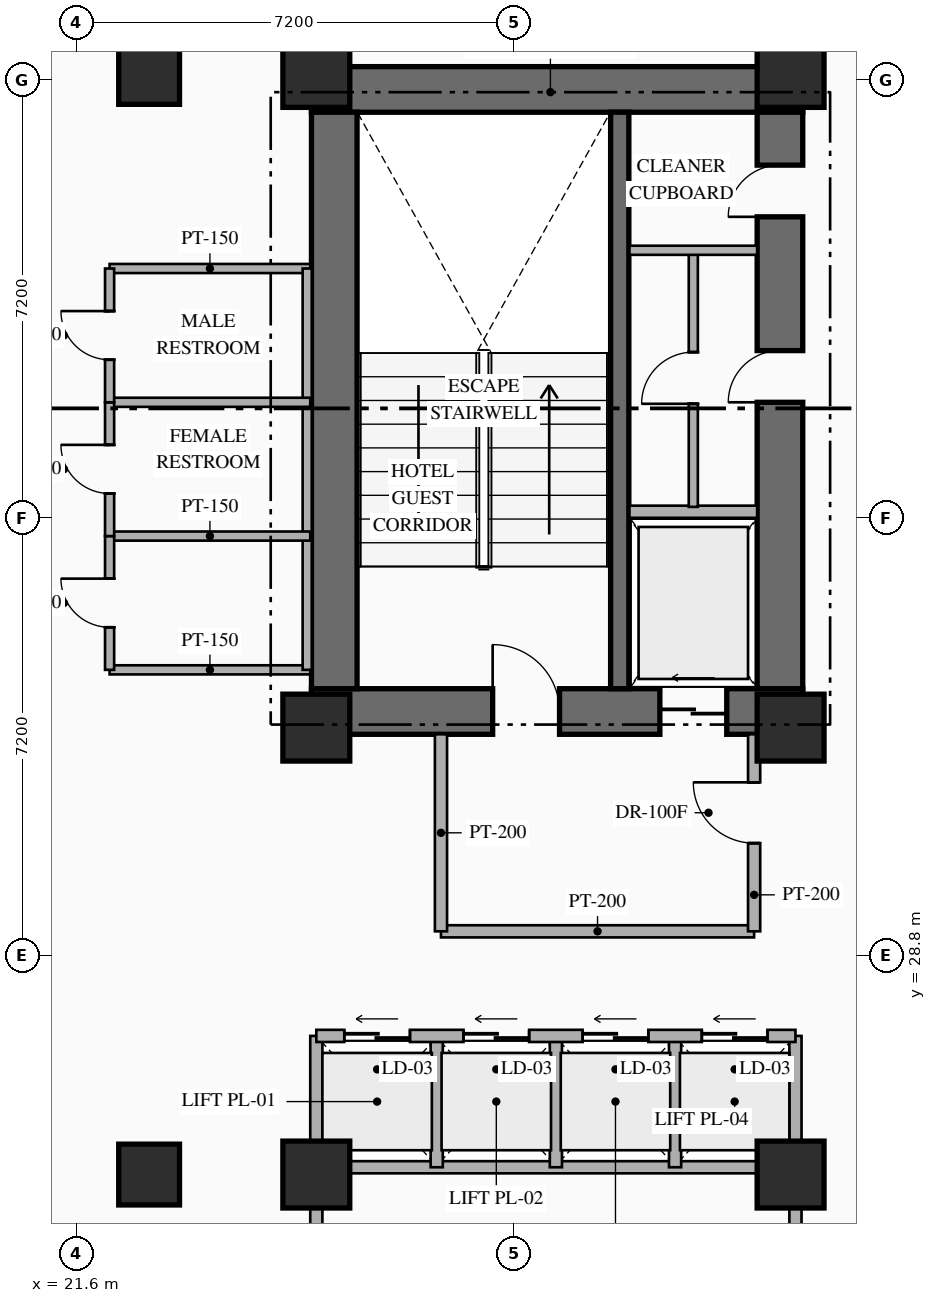
"""IFC4 building model, lengths in metres.
Left out: names, types, materials, properties, quantities, classifications, styles, units other than length and angle.
Written with IfcOpenShell. Run it as: python <this file> out.ifc"""

import sys

from ifc_helpers import new_model, si_unit, direction, frame, frame_2d, origin, origin_2d, place, context, subcontext, project, spatial, rectangle, hollow_rectangle, extrude, element, fill, save


model = new_model("IFC4")
c1 = context("Model", 3, precision=1e-05, world=origin(), true_north=direction((0.0, 1.0)))
c2 = subcontext(c1, "Body", "Model", "MODEL_VIEW")
j1 = project(units=[si_unit("LENGTHUNIT", "METRE"), si_unit("PLANEANGLEUNIT", "RADIAN")], contexts=[c1])
p1 = place(None, origin())
s1 = spatial("IfcSite", under=j1, at=p1, CompositionType="ELEMENT")
p2 = place(p1, origin())
s2 = spatial("IfcBuilding", under=s1, at=p2, CompositionType="ELEMENT")
p3 = place(p2, frame((0.0, 0.0, 43.3)))
s3 = spatial("IfcBuildingStorey", under=s2, at=p3, CompositionType="ELEMENT", Elevation=43.3)
p4 = place(p3, frame((25.47, 32.815, 0.0), z_axis=(0.0, 0.0, 1.0), x_axis=(1.0, 0.0, 0.0)))
e1 = element("IfcWall", 1, at=p4, inside=s3, PredefinedType="SHEAR", context=c2, shape_type="SweptSolid", body=[
    extrude(rectangle(XDim=8.08, YDim=0.75, at=frame_2d((4.04, 0.0))), origin(), (0.0, 0.0, 1.0), 3.35),
])
p5 = place(p4, frame((2.98, 0.0, 0.0)))
e2 = element("IfcOpeningElement", 2, at=p5, cuts=e1, PredefinedType="OPENING", context=c2, shape_type="SweptSolid", body=[
    extrude(rectangle(XDim=1.1, YDim=2.2, at=frame_2d((0.55, 1.1))), frame((0.0, 0.385, 0.0), z_axis=(0.0, -1.0, 0.0), x_axis=(1.0, 0.0, 0.0)), (0.0, 0.0, 1.0), 0.77),
])
p6 = place(p4, frame((5.73, 0.0, 0.0)))
e3 = element("IfcOpeningElement", 3, at=p6, cuts=e1, PredefinedType="OPENING", context=c2, shape_type="SweptSolid", body=[
    extrude(rectangle(XDim=1.1, YDim=2.15, at=frame_2d((0.55, 1.075))), frame((0.0, 0.385, 0.0), z_axis=(0.0, -1.0, 0.0), x_axis=(1.0, 0.0, 0.0)), (0.0, 0.0, 1.0), 0.77),
])
p7 = place(p3, frame((25.47, 43.045, 0.0), z_axis=(0.0, 0.0, 1.0), x_axis=(1.0, 0.0, 0.0)))
e4 = element("IfcWall", 4, at=p7, inside=s3, PredefinedType="SHEAR", context=c2, shape_type="SweptSolid", body=[
    extrude(rectangle(XDim=8.08, YDim=0.75, at=frame_2d((4.04, 0.0))), origin(), (0.0, 0.0, 1.0), 3.35),
])
p8 = place(p3, frame((25.845, 33.19, 0.0), z_axis=(0.0, 0.0, 1.0), x_axis=(0.0, 1.0, 0.0)))
e5 = element("IfcWall", 5, at=p8, inside=s3, PredefinedType="SHEAR", context=c2, shape_type="SweptSolid", body=[
    extrude(rectangle(XDim=9.48, YDim=0.75, at=frame_2d((4.74, 0.0))), origin(), (0.0, 0.0, 1.0), 3.35),
])
p9 = place(p3, frame((33.175, 33.19, 0.0), z_axis=(0.0, 0.0, 1.0), x_axis=(0.0, 1.0, 0.0)))
e6 = element("IfcWall", 6, at=p9, inside=s3, PredefinedType="SHEAR", context=c2, shape_type="SweptSolid", body=[
    extrude(rectangle(XDim=9.48, YDim=0.75, at=frame_2d((4.74, 0.0))), origin(), (0.0, 0.0, 1.0), 3.35),
])
p10 = place(p9, frame((4.71, 0.0, 0.0)))
e7 = element("IfcOpeningElement", 7, at=p10, cuts=e6, PredefinedType="OPENING", context=c2, shape_type="SweptSolid", body=[
    extrude(rectangle(XDim=0.85, YDim=2.08, at=frame_2d((0.425, 1.04))), frame((0.0, 0.385, 0.0), z_axis=(0.0, -1.0, 0.0), x_axis=(1.0, 0.0, 0.0)), (0.0, 0.0, 1.0), 0.77),
])
p11 = place(p9, frame((7.76, 0.0, 0.0)))
e8 = element("IfcOpeningElement", 8, at=p11, cuts=e6, PredefinedType="OPENING", context=c2, shape_type="SweptSolid", body=[
    extrude(rectangle(XDim=0.85, YDim=2.08, at=frame_2d((0.425, 1.04))), frame((0.0, 0.385, 0.0), z_axis=(0.0, -1.0, 0.0), x_axis=(1.0, 0.0, 0.0)), (0.0, 0.0, 1.0), 0.77),
])
p12 = place(p3, frame((30.54, 33.19, 0.0), z_axis=(0.0, 0.0, 1.0), x_axis=(0.0, 1.0, 0.0)))
e9 = element("IfcWall", 9, at=p12, inside=s3, PredefinedType="SHEAR", context=c2, shape_type="SweptSolid", body=[
    extrude(rectangle(XDim=9.48, YDim=0.3, at=frame_2d((4.74, 0.0))), origin(), (0.0, 0.0, 1.0), 3.35),
])
for number, where, z_axis, x_axis in (
    (10, (25.55, 32.55, 0.0), (0.0, 0.0, 1.0), (1.0, 0.0, 0.0)),
    (11, (33.35, 32.55, 0.0), (0.0, 0.0, 1.0), (1.0, 0.0, 0.0)),
    (12, (25.55, 43.3, 0.0), (0.0, 0.0, 1.0), (1.0, 0.0, 0.0)),
    (13, (33.35, 43.3, 0.0), (0.0, 0.0, 1.0), (1.0, 0.0, 0.0)),
):
    element("IfcColumn", number, at=place(p3, frame(where, z_axis=z_axis, x_axis=x_axis)), inside=s3, PredefinedType="COLUMN", context=c2, shape_type="SweptSolid", body=[
        extrude(rectangle(XDim=1.1, YDim=1.1, at=origin_2d()), origin(), (0.0, 0.0, 1.0), 3.35),
    ])
for number, where, z_axis, x_axis in (
    (14, (25.55, 25.2, 0.0), (0.0, 0.0, 1.0), (1.0, 0.0, 0.0)),
    (15, (33.35, 25.2, 0.0), (0.0, 0.0, 1.0), (1.0, 0.0, 0.0)),
):
    element("IfcColumn", number, at=place(p3, frame(where, z_axis=z_axis, x_axis=x_axis)), inside=s3, PredefinedType="COLUMN", context=c2, shape_type="SweptSolid", body=[
        extrude(hollow_rectangle(XDim=1.1, YDim=1.1, WallThickness=0.04, at=origin_2d()), origin(), (0.0, 0.0, 1.0), 3.35),
    ])
for number, where, z_axis, x_axis in (
    (16, (22.8, 25.2, 0.0), (0.0, 0.0, 1.0), (1.0, 0.0, 0.0)),
    (17, (22.8, 43.3, 0.0), (0.0, 0.0, 1.0), (1.0, 0.0, 0.0)),
):
    element("IfcColumn", number, at=place(p3, frame(where, z_axis=z_axis, x_axis=x_axis)), inside=s3, PredefinedType="COLUMN", context=c2, shape_type="SweptSolid", body=[
        extrude(hollow_rectangle(XDim=1.0, YDim=1.0, WallThickness=0.038, at=origin_2d()), origin(), (0.0, 0.0, 1.0), 3.35),
    ])
p13 = place(p3, frame((30.7, 36.1, 0.0), z_axis=(0.0, 0.0, 1.0), x_axis=(1.0, 0.0, 0.0)))
e18 = element("IfcWall", 18, at=p13, inside=s3, PredefinedType="STANDARD", context=c2, shape_type="SweptSolid", body=[
    extrude(rectangle(XDim=2.1, YDim=0.2, at=frame_2d((1.05, 0.0))), origin(), (0.0, 0.0, 1.0), 3.13),
])
p14 = place(p3, frame((31.75, 36.18, 0.0), z_axis=(0.0, 0.0, 1.0), x_axis=(0.0, 1.0, 0.0)))
e19 = element("IfcWall", 19, at=p14, inside=s3, PredefinedType="PARTITIONING", context=c2, shape_type="SweptSolid", body=[
    extrude(rectangle(XDim=4.24, YDim=0.15, at=frame_2d((2.12, 0.0))), origin(), (0.0, 0.0, 1.0), 3.13),
])
p15 = place(p14, frame((1.695, 0.0, 0.0)))
e20 = element("IfcOpeningElement", 20, at=p15, cuts=e19, PredefinedType="OPENING", context=c2, shape_type="SweptSolid", body=[
    extrude(rectangle(XDim=0.85, YDim=2.08, at=frame_2d((0.425, 1.04))), frame((0.0, 0.085, 0.0), z_axis=(0.0, -1.0, 0.0), x_axis=(1.0, 0.0, 0.0)), (0.0, 0.0, 1.0), 0.17),
])
p16 = place(p3, frame((30.7, 40.4, 0.0), z_axis=(0.0, 0.0, 1.0), x_axis=(1.0, 0.0, 0.0)))
e21 = element("IfcWall", 21, at=p16, inside=s3, PredefinedType="PARTITIONING", context=c2, shape_type="SweptSolid", body=[
    extrude(rectangle(XDim=2.1, YDim=0.15, at=frame_2d((1.05, 0.0))), origin(), (0.0, 0.0, 1.0), 3.13),
])
p17 = place(p3, frame((27.6, 29.2, 0.0), z_axis=(0.0, 0.0, 1.0), x_axis=(1.0, 0.0, 0.0)))
e22 = element("IfcWall", 22, at=p17, inside=s3, PredefinedType="STANDARD", context=c2, shape_type="SweptSolid", body=[
    extrude(rectangle(XDim=5.15, YDim=0.2, at=frame_2d((2.575, 0.0))), origin(), (0.0, 0.0, 1.0), 3.13),
])
p18 = place(p3, frame((27.6, 29.2, 0.0), z_axis=(0.0, 0.0, 1.0), x_axis=(0.0, 1.0, 0.0)))
e23 = element("IfcWall", 23, at=p18, inside=s3, PredefinedType="STANDARD", context=c2, shape_type="SweptSolid", body=[
    extrude(rectangle(XDim=3.24, YDim=0.2, at=frame_2d((1.62, 0.0))), origin(), (0.0, 0.0, 1.0), 3.13),
])
p19 = place(p3, frame((32.75, 29.2, 0.0), z_axis=(0.0, 0.0, 1.0), x_axis=(0.0, 1.0, 0.0)))
e24 = element("IfcWall", 24, at=p19, inside=s3, PredefinedType="STANDARD", context=c2, shape_type="SweptSolid", body=[
    extrude(rectangle(XDim=3.24, YDim=0.2, at=frame_2d((1.62, 0.0))), origin(), (0.0, 0.0, 1.0), 3.13),
])
p20 = place(p19, frame((1.45, 0.0, 0.0)))
e25 = element("IfcOpeningElement", 25, at=p20, cuts=e24, PredefinedType="OPENING", context=c2, shape_type="SweptSolid", body=[
    extrude(rectangle(XDim=1.0, YDim=2.2, at=frame_2d((0.5, 1.1))), frame((0.0, 0.11, 0.0), z_axis=(0.0, -1.0, 0.0), x_axis=(1.0, 0.0, 0.0)), (0.0, 0.0, 1.0), 0.22),
])
for number, where, z_axis, x_axis in (
    (26, (25.55, 23.4, 0.0), (0.0, 0.0, 1.0), (0.0, 1.0, 0.0)),
    (27, (33.43, 23.4, 0.0), (0.0, 0.0, 1.0), (0.0, 1.0, 0.0)),
):
    element("IfcWall", number, at=place(p3, frame(where, z_axis=z_axis, x_axis=x_axis)), inside=s3, PredefinedType="STANDARD", context=c2, shape_type="SweptSolid", body=[
        extrude(rectangle(XDim=4.08, YDim=0.2, at=frame_2d((2.04, 0.0))), origin(), (0.0, 0.0, 1.0), 2.425),
    ])
p21 = place(p3, frame((25.55, 25.32, 0.0), z_axis=(0.0, 0.0, 1.0), x_axis=(1.0, 0.0, 0.0)))
e28 = element("IfcWall", 28, at=p21, inside=s3, PredefinedType="STANDARD", context=c2, shape_type="SweptSolid", body=[
    extrude(rectangle(XDim=7.88, YDim=0.2, at=frame_2d((3.94, 0.0))), origin(), (0.0, 0.0, 1.0), 2.525),
])
for number, where, z_axis, x_axis in (
    (29, (27.53, 25.32, 0.0), (0.0, 0.0, 1.0), (0.0, 1.0, 0.0)),
    (30, (29.49, 25.32, 0.0), (0.0, 0.0, 1.0), (0.0, 1.0, 0.0)),
    (31, (31.45, 25.32, 0.0), (0.0, 0.0, 1.0), (0.0, 1.0, 0.0)),
):
    element("IfcWall", number, at=place(p3, frame(where, z_axis=z_axis, x_axis=x_axis)), inside=s3, PredefinedType="STANDARD", context=c2, shape_type="SweptSolid", body=[
        extrude(rectangle(XDim=2.16, YDim=0.2, at=frame_2d((1.08, 0.0))), origin(), (0.0, 0.0, 1.0), 3.13),
    ])
p22 = place(p3, frame((25.55, 27.48, 0.0), z_axis=(0.0, 0.0, 1.0), x_axis=(1.0, 0.0, 0.0)))
e32 = element("IfcWall", 32, at=p22, inside=s3, PredefinedType="STANDARD", context=c2, shape_type="SweptSolid", body=[
    extrude(rectangle(XDim=7.88, YDim=0.2, at=frame_2d((3.94, 0.0))), origin(), (0.0, 0.0, 1.0), 3.13),
])
p23 = place(p22, frame((0.46, 0.0, 0.0)))
e33 = element("IfcOpeningElement", 33, at=p23, cuts=e32, PredefinedType="OPENING", context=c2, shape_type="SweptSolid", body=[
    extrude(rectangle(XDim=1.08, YDim=2.15, at=frame_2d((0.54, 1.075))), frame((0.0, 0.11, 0.0), z_axis=(0.0, -1.0, 0.0), x_axis=(1.0, 0.0, 0.0)), (0.0, 0.0, 1.0), 0.22),
])
p24 = place(p22, frame((2.42, 0.0, 0.0)))
e34 = element("IfcOpeningElement", 34, at=p24, cuts=e32, PredefinedType="OPENING", context=c2, shape_type="SweptSolid", body=[
    extrude(rectangle(XDim=1.08, YDim=2.15, at=frame_2d((0.54, 1.075))), frame((0.0, 0.11, 0.0), z_axis=(0.0, -1.0, 0.0), x_axis=(1.0, 0.0, 0.0)), (0.0, 0.0, 1.0), 0.22),
])
p25 = place(p22, frame((4.38, 0.0, 0.0)))
e35 = element("IfcOpeningElement", 35, at=p25, cuts=e32, PredefinedType="OPENING", context=c2, shape_type="SweptSolid", body=[
    extrude(rectangle(XDim=1.08, YDim=2.15, at=frame_2d((0.54, 1.075))), frame((0.0, 0.11, 0.0), z_axis=(0.0, -1.0, 0.0), x_axis=(1.0, 0.0, 0.0)), (0.0, 0.0, 1.0), 0.22),
])
p26 = place(p22, frame((6.34, 0.0, 0.0)))
e36 = element("IfcOpeningElement", 36, at=p26, cuts=e32, PredefinedType="OPENING", context=c2, shape_type="SweptSolid", body=[
    extrude(rectangle(XDim=1.08, YDim=2.15, at=frame_2d((0.54, 1.075))), frame((0.0, 0.11, 0.0), z_axis=(0.0, -1.0, 0.0), x_axis=(1.0, 0.0, 0.0)), (0.0, 0.0, 1.0), 0.22),
])
for number, where, z_axis, x_axis in (
    (37, (22.15, 33.5, 0.0), (0.0, 0.0, 1.0), (1.0, 0.0, 0.0)),
    (38, (22.15, 40.1, 0.0), (0.0, 0.0, 1.0), (1.0, 0.0, 0.0)),
):
    element("IfcWall", number, at=place(p3, frame(where, z_axis=z_axis, x_axis=x_axis)), inside=s3, PredefinedType="PARTITIONING", context=c2, shape_type="SweptSolid", body=[
        extrude(rectangle(XDim=3.3, YDim=0.15, at=frame_2d((1.65, 0.0))), origin(), (0.0, 0.0, 1.0), 3.13),
    ])
p27 = place(p3, frame((25.4, 33.5, 0.0), z_axis=(0.0, 0.0, 1.0), x_axis=(0.0, 1.0, 0.0)))
e39 = element("IfcWall", 39, at=p27, inside=s3, PredefinedType="PARTITIONING", context=c2, shape_type="SweptSolid", body=[
    extrude(rectangle(XDim=6.6, YDim=0.15, at=frame_2d((3.3, 0.0))), origin(), (0.0, 0.0, 1.0), 3.13),
])
for number, where, z_axis, x_axis in (
    (40, (22.15, 35.7, 0.0), (0.0, 0.0, 1.0), (1.0, 0.0, 0.0)),
    (41, (22.15, 37.9, 0.0), (0.0, 0.0, 1.0), (1.0, 0.0, 0.0)),
):
    element("IfcWall", number, at=place(p3, frame(where, z_axis=z_axis, x_axis=x_axis)), inside=s3, PredefinedType="PARTITIONING", context=c2, shape_type="SweptSolid", body=[
        extrude(rectangle(XDim=3.3, YDim=0.15, at=frame_2d((1.65, 0.0))), origin(), (0.0, 0.0, 1.0), 3.13),
    ])
p28 = place(p3, frame((22.15, 33.5, 0.0), z_axis=(0.0, 0.0, 1.0), x_axis=(0.0, 1.0, 0.0)))
e42 = element("IfcWall", 42, at=p28, inside=s3, PredefinedType="PARTITIONING", context=c2, shape_type="SweptSolid", body=[
    extrude(rectangle(XDim=2.2, YDim=0.15, at=frame_2d((1.1, 0.0))), origin(), (0.0, 0.0, 1.0), 3.13),
])
p29 = place(p28, frame((0.7, 0.0, 0.0)))
e43 = element("IfcOpeningElement", 43, at=p29, cuts=e42, PredefinedType="OPENING", context=c2, shape_type="SweptSolid", body=[
    extrude(rectangle(XDim=0.8, YDim=2.06, at=frame_2d((0.4, 1.03))), frame((0.0, 0.085, 0.0), z_axis=(0.0, -1.0, 0.0), x_axis=(1.0, 0.0, 0.0)), (0.0, 0.0, 1.0), 0.17),
])
p30 = place(p3, frame((22.15, 35.7, 0.0), z_axis=(0.0, 0.0, 1.0), x_axis=(0.0, 1.0, 0.0)))
e44 = element("IfcWall", 44, at=p30, inside=s3, PredefinedType="PARTITIONING", context=c2, shape_type="SweptSolid", body=[
    extrude(rectangle(XDim=2.2, YDim=0.15, at=frame_2d((1.1, 0.0))), origin(), (0.0, 0.0, 1.0), 3.13),
])
p31 = place(p30, frame((0.7, 0.0, 0.0)))
e45 = element("IfcOpeningElement", 45, at=p31, cuts=e44, PredefinedType="OPENING", context=c2, shape_type="SweptSolid", body=[
    extrude(rectangle(XDim=0.8, YDim=2.06, at=frame_2d((0.4, 1.03))), frame((0.0, 0.085, 0.0), z_axis=(0.0, -1.0, 0.0), x_axis=(1.0, 0.0, 0.0)), (0.0, 0.0, 1.0), 0.17),
])
p32 = place(p3, frame((22.15, 37.9, 0.0), z_axis=(0.0, 0.0, 1.0), x_axis=(0.0, 1.0, 0.0)))
e46 = element("IfcWall", 46, at=p32, inside=s3, PredefinedType="PARTITIONING", context=c2, shape_type="SweptSolid", body=[
    extrude(rectangle(XDim=2.2, YDim=0.15, at=frame_2d((1.1, 0.0))), origin(), (0.0, 0.0, 1.0), 3.13),
])
p33 = place(p32, frame((0.7, 0.0, 0.0)))
e47 = element("IfcOpeningElement", 47, at=p33, cuts=e46, PredefinedType="OPENING", context=c2, shape_type="SweptSolid", body=[
    extrude(rectangle(XDim=0.8, YDim=2.06, at=frame_2d((0.4, 1.03))), frame((0.0, 0.085, 0.0), z_axis=(0.0, -1.0, 0.0), x_axis=(1.0, 0.0, 0.0)), (0.0, 0.0, 1.0), 0.17),
])
p34 = place(p3, frame((33.384, 17.312, 0.0), z_axis=(0.0, 0.0, 1.0), x_axis=(0.600008743659, 0.799993442181, 0.0)))
e48 = element("IfcWall", 48, at=p34, inside=s3, PredefinedType="PARTITIONING", context=c2, shape_type="SweptSolid", body=[
    extrude(rectangle(XDim=8.935, YDim=0.15, at=frame_2d((4.468, 0.0))), origin(), (0.0, 0.0, 1.0), 3.13),
])
p35 = place(p5, origin())
e49 = element("IfcDoor", 49, at=p35, inside=s3, OperationType="SINGLE_SWING_LEFT", PredefinedType="DOOR", context=c2, shape_type="SweptSolid", body=[
    extrude(rectangle(XDim=1.1, YDim=2.2, at=frame_2d((0.55, 1.1))), frame((0.0, 0.025, 0.0), z_axis=(0.0, -1.0, 0.0), x_axis=(1.0, 0.0, 0.0)), (0.0, 0.0, 1.0), 0.05),
])
fill(e2, e49)
p36 = place(p6, origin())
e50 = element("IfcDoor", 50, at=p36, inside=s3, OperationType="SLIDING_TO_LEFT", PredefinedType="USERDEFINED", context=c2, shape_type="SweptSolid", body=[
    extrude(rectangle(XDim=1.1, YDim=2.15, at=frame_2d((0.55, 1.075))), frame((0.0, 0.025, 0.0), z_axis=(0.0, -1.0, 0.0), x_axis=(1.0, 0.0, 0.0)), (0.0, 0.0, 1.0), 0.05),
])
fill(e3, e50)
p37 = place(p10, origin())
e51 = element("IfcDoor", 51, at=p37, inside=s3, OperationType="SINGLE_SWING_LEFT", PredefinedType="DOOR", context=c2, shape_type="SweptSolid", body=[
    extrude(rectangle(XDim=0.85, YDim=2.08, at=frame_2d((0.425, 1.04))), frame((0.0, 0.025, 0.0), z_axis=(0.0, -1.0, 0.0), x_axis=(1.0, 0.0, 0.0)), (0.0, 0.0, 1.0), 0.05),
])
fill(e7, e51)
p38 = place(p11, origin())
e52 = element("IfcDoor", 52, at=p38, inside=s3, OperationType="SINGLE_SWING_LEFT", PredefinedType="DOOR", context=c2, shape_type="SweptSolid", body=[
    extrude(rectangle(XDim=0.85, YDim=2.08, at=frame_2d((0.425, 1.04))), frame((0.0, 0.025, 0.0), z_axis=(0.0, -1.0, 0.0), x_axis=(1.0, 0.0, 0.0)), (0.0, 0.0, 1.0), 0.05),
])
fill(e8, e52)
p39 = place(p15, origin())
e53 = element("IfcDoor", 53, at=p39, inside=s3, OperationType="SINGLE_SWING_LEFT", PredefinedType="DOOR", context=c2, shape_type="SweptSolid", body=[
    extrude(rectangle(XDim=0.85, YDim=2.08, at=frame_2d((0.425, 1.04))), frame((0.0, 0.025, 0.0), z_axis=(0.0, -1.0, 0.0), x_axis=(1.0, 0.0, 0.0)), (0.0, 0.0, 1.0), 0.05),
])
fill(e20, e53)
p40 = place(p20, origin())
e54 = element("IfcDoor", 54, at=p40, inside=s3, OperationType="SINGLE_SWING_RIGHT", PredefinedType="DOOR", context=c2, shape_type="SweptSolid", body=[
    extrude(rectangle(XDim=1.0, YDim=2.2, at=frame_2d((0.5, 1.1))), frame((0.0, 0.025, 0.0), z_axis=(0.0, -1.0, 0.0), x_axis=(1.0, 0.0, 0.0)), (0.0, 0.0, 1.0), 0.05),
])
fill(e25, e54)
p41 = place(p23, origin())
e55 = element("IfcDoor", 55, at=p41, inside=s3, OperationType="SLIDING_TO_LEFT", PredefinedType="USERDEFINED", context=c2, shape_type="SweptSolid", body=[
    extrude(rectangle(XDim=1.08, YDim=2.15, at=frame_2d((0.54, 1.075))), frame((0.0, 0.025, 0.0), z_axis=(0.0, -1.0, 0.0), x_axis=(1.0, 0.0, 0.0)), (0.0, 0.0, 1.0), 0.05),
])
fill(e33, e55)
p42 = place(p24, origin())
e56 = element("IfcDoor", 56, at=p42, inside=s3, OperationType="SLIDING_TO_LEFT", PredefinedType="USERDEFINED", context=c2, shape_type="SweptSolid", body=[
    extrude(rectangle(XDim=1.08, YDim=2.15, at=frame_2d((0.54, 1.075))), frame((0.0, 0.025, 0.0), z_axis=(0.0, -1.0, 0.0), x_axis=(1.0, 0.0, 0.0)), (0.0, 0.0, 1.0), 0.05),
])
fill(e34, e56)
p43 = place(p25, origin())
e57 = element("IfcDoor", 57, at=p43, inside=s3, OperationType="SLIDING_TO_LEFT", PredefinedType="USERDEFINED", context=c2, shape_type="SweptSolid", body=[
    extrude(rectangle(XDim=1.08, YDim=2.15, at=frame_2d((0.54, 1.075))), frame((0.0, 0.025, 0.0), z_axis=(0.0, -1.0, 0.0), x_axis=(1.0, 0.0, 0.0)), (0.0, 0.0, 1.0), 0.05),
])
fill(e35, e57)
p44 = place(p26, origin())
e58 = element("IfcDoor", 58, at=p44, inside=s3, OperationType="SLIDING_TO_LEFT", PredefinedType="USERDEFINED", context=c2, shape_type="SweptSolid", body=[
    extrude(rectangle(XDim=1.08, YDim=2.15, at=frame_2d((0.54, 1.075))), frame((0.0, 0.025, 0.0), z_axis=(0.0, -1.0, 0.0), x_axis=(1.0, 0.0, 0.0)), (0.0, 0.0, 1.0), 0.05),
])
fill(e36, e58)
p45 = place(p29, origin())
e59 = element("IfcDoor", 59, at=p45, inside=s3, OperationType="SINGLE_SWING_RIGHT", PredefinedType="DOOR", context=c2, shape_type="SweptSolid", body=[
    extrude(rectangle(XDim=0.8, YDim=2.06, at=frame_2d((0.4, 1.03))), frame((0.0, 0.025, 0.0), z_axis=(0.0, -1.0, 0.0), x_axis=(1.0, 0.0, 0.0)), (0.0, 0.0, 1.0), 0.05),
])
fill(e43, e59)
p46 = place(p31, origin())
e60 = element("IfcDoor", 60, at=p46, inside=s3, OperationType="SINGLE_SWING_RIGHT", PredefinedType="DOOR", context=c2, shape_type="SweptSolid", body=[
    extrude(rectangle(XDim=0.8, YDim=2.06, at=frame_2d((0.4, 1.03))), frame((0.0, 0.025, 0.0), z_axis=(0.0, -1.0, 0.0), x_axis=(1.0, 0.0, 0.0)), (0.0, 0.0, 1.0), 0.05),
])
fill(e45, e60)
p47 = place(p33, origin())
e61 = element("IfcDoor", 61, at=p47, inside=s3, OperationType="SINGLE_SWING_RIGHT", PredefinedType="DOOR", context=c2, shape_type="SweptSolid", body=[
    extrude(rectangle(XDim=0.8, YDim=2.06, at=frame_2d((0.4, 1.03))), frame((0.0, 0.025, 0.0), z_axis=(0.0, -1.0, 0.0), x_axis=(1.0, 0.0, 0.0)), (0.0, 0.0, 1.0), 0.05),
])
fill(e47, e61)
save(model, sys.argv[1])
